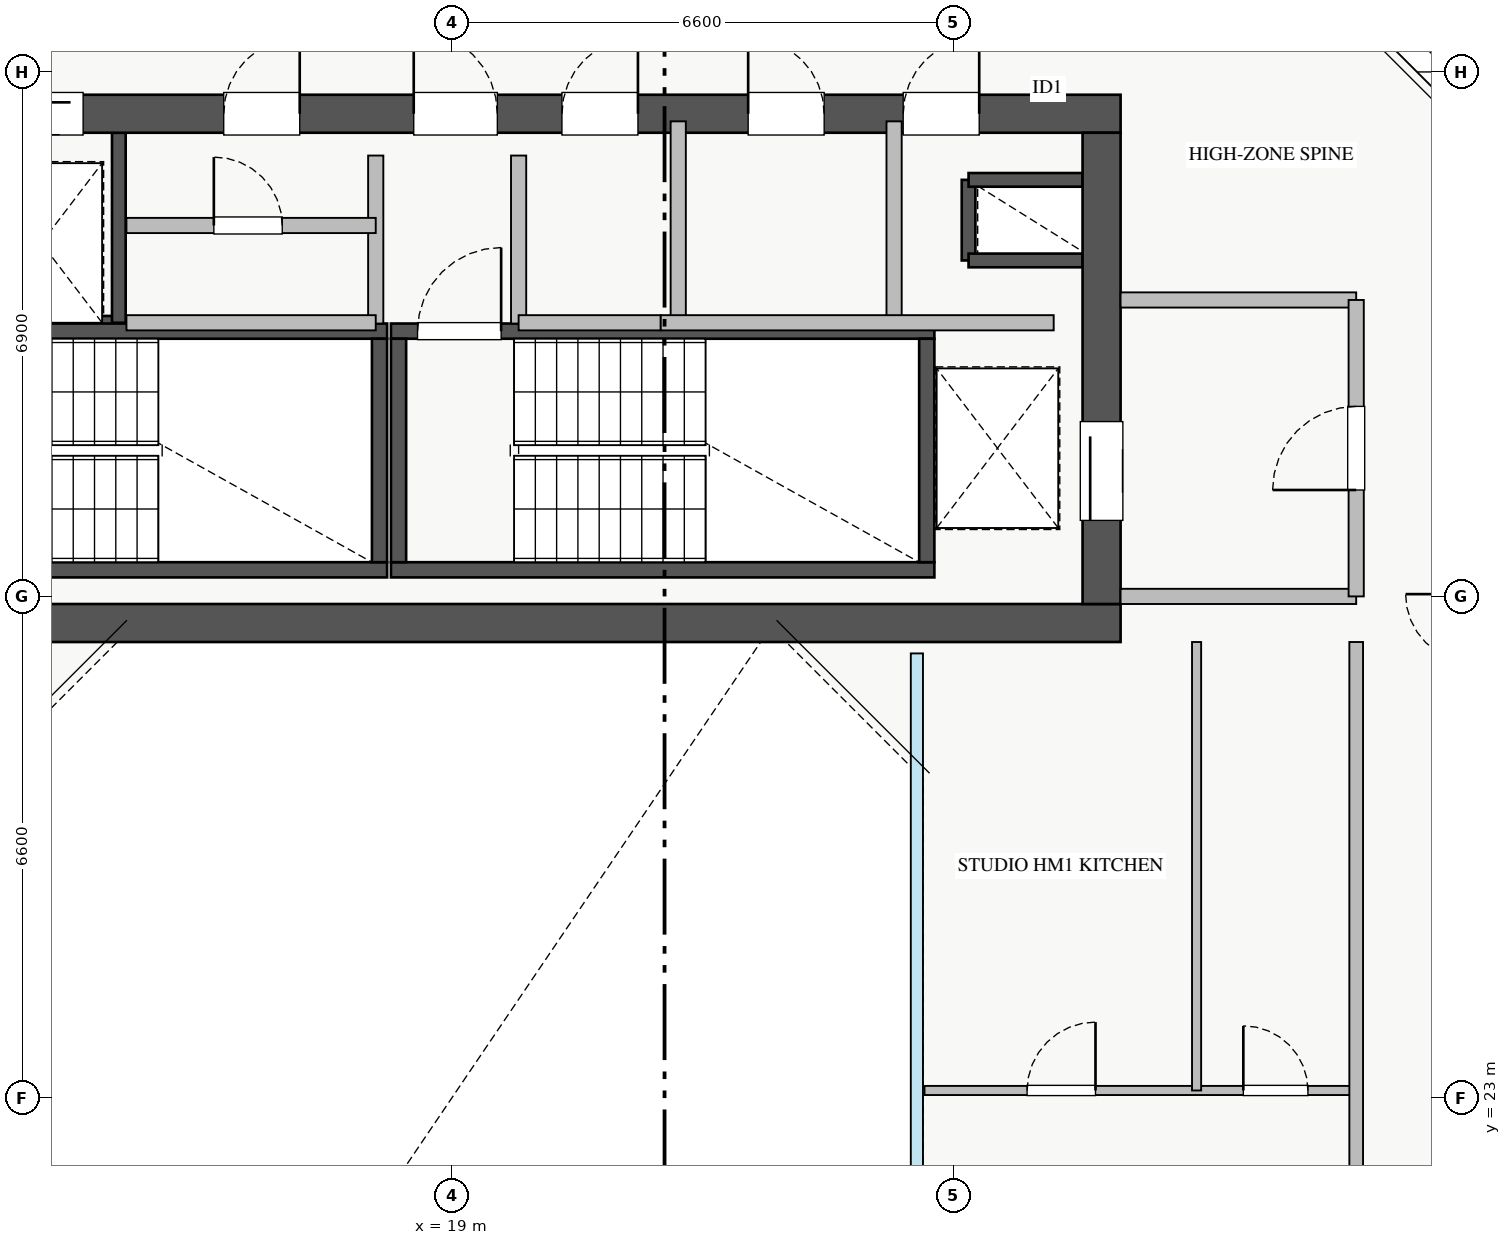
"""IFC4 building model, lengths in metres.
Left out: names, types, materials, properties, quantities, classifications, styles, units other than length and angle.
Written with IfcOpenShell. Run it as: python <this file> out.ifc"""

import sys

from ifc_helpers import new_model, si_unit, direction, frame, frame_2d, origin, place, context, subcontext, project, spatial, rectangle, extrude, source, transform, mapped, element, fill, save


model = new_model("IFC4")
c1 = context("Model", 3, precision=1e-05, world=origin(), true_north=direction((0.0, 1.0)))
c2 = subcontext(c1, "Body", "Model", "MODEL_VIEW")
j1 = project(units=[si_unit("LENGTHUNIT", "METRE"), si_unit("PLANEANGLEUNIT", "RADIAN")], contexts=[c1])
p1 = place(None, origin())
s1 = spatial("IfcSite", under=j1, at=p1, CompositionType="ELEMENT")
p2 = place(p1, origin())
s2 = spatial("IfcBuilding", under=s1, at=p2, CompositionType="ELEMENT")
p3 = place(p2, frame((0.0, 0.0, 190.5)))
s3 = spatial("IfcBuildingStorey", under=s2, at=p3, CompositionType="ELEMENT", Elevation=190.5)
p4 = place(p3, frame((12.68, 33.2, 0.0), z_axis=(0.0, 0.0, 1.0), x_axis=(1.0, 0.0, 0.0)))
e1 = element("IfcWall", 1, at=p4, inside=s3, PredefinedType="SHEAR", context=c2, shape_type="SweptSolid", body=[
    extrude(rectangle(XDim=1.94, YDim=0.18, at=frame_2d((0.97, 0.0))), origin(), (0.0, 0.0, 1.0), 3.07),
])
p5 = place(p3, frame((14.62, 33.2, 0.0), z_axis=(0.0, 0.0, 1.0), x_axis=(0.0, 1.0, 0.0)))
e2 = element("IfcWall", 2, at=p5, inside=s3, PredefinedType="SHEAR", context=c2, shape_type="SweptSolid", body=[
    extrude(rectangle(XDim=2.5, YDim=0.18, at=frame_2d((1.25, 0.0))), origin(), (0.0, 0.0, 1.0), 3.07),
])
p6 = place(p3, frame((25.8, 34.02, 0.0), z_axis=(0.0, 0.0, 1.0), x_axis=(0.0, 1.0, 0.0)))
e3 = element("IfcWall", 3, at=p6, inside=s3, PredefinedType="SHEAR", context=c2, shape_type="SweptSolid", body=[
    extrude(rectangle(XDim=1.06, YDim=0.18, at=frame_2d((0.53, 0.0))), origin(), (0.0, 0.0, 1.0), 3.07),
])
for number, where, z_axis, x_axis in (
    (4, (25.8, 35.08, 0.0), (0.0, 0.0, 1.0), (1.0, 0.0, 0.0)),
    (5, (25.8, 34.02, 0.0), (0.0, 0.0, 1.0), (1.0, 0.0, 0.0)),
):
    element("IfcWall", number, at=place(p3, frame(where, z_axis=z_axis, x_axis=x_axis)), inside=s3, PredefinedType="SHEAR", context=c2, shape_type="SweptSolid", body=[
        extrude(rectangle(XDim=1.5, YDim=0.18, at=frame_2d((0.75, 0.0))), origin(), (0.0, 0.0, 1.0), 3.07),
    ])
p7 = place(p3, frame((10.7, 29.95, 0.0), z_axis=(0.0, 0.0, 1.0), x_axis=(1.0, 0.0, 0.0)))
e6 = element("IfcWall", 6, at=p7, inside=s3, PredefinedType="SHEAR", context=c2, shape_type="SweptSolid", body=[
    extrude(rectangle(XDim=7.45, YDim=0.2, at=frame_2d((3.725, 0.0))), origin(), (0.0, 0.0, 1.0), 3.25),
])
p8 = place(p3, frame((10.7, 33.09, 0.0), z_axis=(0.0, 0.0, 1.0), x_axis=(1.0, 0.0, 0.0)))
e7 = element("IfcWall", 7, at=p8, inside=s3, PredefinedType="SHEAR", context=c2, shape_type="SweptSolid", body=[
    extrude(rectangle(XDim=7.45, YDim=0.2, at=frame_2d((3.725, 0.0))), origin(), (0.0, 0.0, 1.0), 3.25),
])
p9 = place(p8, frame((0.35, 0.0, 0.0)))
e8 = element("IfcOpeningElement", 8, at=p9, cuts=e7, PredefinedType="OPENING", context=c2, shape_type="SweptSolid", body=[
    extrude(rectangle(XDim=1.1, YDim=2.05, at=frame_2d((0.55, 1.025))), frame((0.0, 0.11, 0.0), z_axis=(0.0, -1.0, 0.0), x_axis=(1.0, 0.0, 0.0)), (0.0, 0.0, 1.0), 0.22),
])
p10 = place(p3, frame((18.05, 30.05, 0.0), z_axis=(0.0, 0.0, 1.0), x_axis=(0.0, 1.0, 0.0)))
e9 = element("IfcWall", 9, at=p10, inside=s3, PredefinedType="SHEAR", context=c2, shape_type="SweptSolid", body=[
    extrude(rectangle(XDim=2.94, YDim=0.2, at=frame_2d((1.47, 0.0))), origin(), (0.0, 0.0, 1.0), 3.25),
])
p11 = place(p3, frame((18.2, 29.95, 0.0), z_axis=(0.0, 0.0, 1.0), x_axis=(1.0, 0.0, 0.0)))
e10 = element("IfcWall", 10, at=p11, inside=s3, PredefinedType="SHEAR", context=c2, shape_type="SweptSolid", body=[
    extrude(rectangle(XDim=7.15, YDim=0.2, at=frame_2d((3.575, 0.0))), origin(), (0.0, 0.0, 1.0), 3.25),
])
p12 = place(p3, frame((18.2, 33.09, 0.0), z_axis=(0.0, 0.0, 1.0), x_axis=(1.0, 0.0, 0.0)))
e11 = element("IfcWall", 11, at=p12, inside=s3, PredefinedType="SHEAR", context=c2, shape_type="SweptSolid", body=[
    extrude(rectangle(XDim=7.15, YDim=0.2, at=frame_2d((3.575, 0.0))), origin(), (0.0, 0.0, 1.0), 3.25),
])
p13 = place(p12, frame((0.35, 0.0, 0.0)))
e12 = element("IfcOpeningElement", 12, at=p13, cuts=e11, PredefinedType="OPENING", context=c2, shape_type="SweptSolid", body=[
    extrude(rectangle(XDim=1.1, YDim=2.05, at=frame_2d((0.55, 1.025))), frame((0.0, 0.11, 0.0), z_axis=(0.0, -1.0, 0.0), x_axis=(1.0, 0.0, 0.0)), (0.0, 0.0, 1.0), 0.22),
])
for number, where, z_axis, x_axis in (
    (13, (18.3, 30.05, 0.0), (0.0, 0.0, 1.0), (0.0, 1.0, 0.0)),
    (14, (25.25, 30.05, 0.0), (0.0, 0.0, 1.0), (0.0, 1.0, 0.0)),
):
    element("IfcWall", number, at=place(p3, frame(where, z_axis=z_axis, x_axis=x_axis)), inside=s3, PredefinedType="SHEAR", context=c2, shape_type="SweptSolid", body=[
        extrude(rectangle(XDim=2.94, YDim=0.2, at=frame_2d((1.47, 0.0))), origin(), (0.0, 0.0, 1.0), 3.25),
    ])
p14 = place(p3, frame((10.2, 29.25, 0.0), z_axis=(0.0, 0.0, 1.0), x_axis=(1.0, 0.0, 0.0)))
e15 = element("IfcWall", 15, at=p14, inside=s3, PredefinedType="SHEAR", context=c2, shape_type="SweptSolid", body=[
    extrude(rectangle(XDim=17.6, YDim=0.5, at=frame_2d((8.8, 0.0))), origin(), (0.0, 0.0, 1.0), 3.25),
])
p15 = place(p3, frame((10.2, 35.95, 0.0), z_axis=(0.0, 0.0, 1.0), x_axis=(1.0, 0.0, 0.0)))
e16 = element("IfcWall", 16, at=p15, inside=s3, PredefinedType="SHEAR", context=c2, shape_type="SweptSolid", body=[
    extrude(rectangle(XDim=17.6, YDim=0.5, at=frame_2d((8.8, 0.0))), origin(), (0.0, 0.0, 1.0), 3.25),
])
p16 = place(p15, frame((1.15, 0.0, 0.0)))
e17 = element("IfcOpeningElement", 17, at=p16, cuts=e16, PredefinedType="OPENING", context=c2, shape_type="SweptSolid", body=[
    extrude(rectangle(XDim=1.1, YDim=2.05, at=frame_2d((0.55, 1.025))), frame((0.0, 0.26, 0.0), z_axis=(0.0, -1.0, 0.0), x_axis=(1.0, 0.0, 0.0)), (0.0, 0.0, 1.0), 0.52),
])
p17 = place(p15, frame((8.3, 0.0, 0.0)))
e18 = element("IfcOpeningElement", 18, at=p17, cuts=e16, PredefinedType="OPENING", context=c2, shape_type="SweptSolid", body=[
    extrude(rectangle(XDim=1.1, YDim=2.05, at=frame_2d((0.55, 1.025))), frame((0.0, 0.26, 0.0), z_axis=(0.0, -1.0, 0.0), x_axis=(1.0, 0.0, 0.0)), (0.0, 0.0, 1.0), 0.52),
])
p18 = place(p15, frame((2.85, 0.0, 0.0)))
e19 = element("IfcOpeningElement", 19, at=p18, cuts=e16, PredefinedType="OPENING", context=c2, shape_type="SweptSolid", body=[
    extrude(rectangle(XDim=1.1, YDim=2.05, at=frame_2d((0.55, 1.025))), frame((0.0, 0.26, 0.0), z_axis=(0.0, -1.0, 0.0), x_axis=(1.0, 0.0, 0.0)), (0.0, 0.0, 1.0), 0.52),
])
p19 = place(p15, frame((5.8, 0.0, 0.0)))
e20 = element("IfcOpeningElement", 20, at=p19, cuts=e16, PredefinedType="OPENING", context=c2, shape_type="SweptSolid", body=[
    extrude(rectangle(XDim=1.0, YDim=2.05, at=frame_2d((0.5, 1.025))), frame((0.0, 0.26, 0.0), z_axis=(0.0, -1.0, 0.0), x_axis=(1.0, 0.0, 0.0)), (0.0, 0.0, 1.0), 0.52),
])
p20 = place(p15, frame((14.74, 0.0, 0.0)))
e21 = element("IfcOpeningElement", 21, at=p20, cuts=e16, PredefinedType="OPENING", context=c2, shape_type="SweptSolid", body=[
    extrude(rectangle(XDim=1.0, YDim=2.05, at=frame_2d((0.5, 1.025))), frame((0.0, 0.26, 0.0), z_axis=(0.0, -1.0, 0.0), x_axis=(1.0, 0.0, 0.0)), (0.0, 0.0, 1.0), 0.52),
])
p21 = place(p15, frame((10.25, 0.0, 0.0)))
e22 = element("IfcOpeningElement", 22, at=p21, cuts=e16, PredefinedType="OPENING", context=c2, shape_type="SweptSolid", body=[
    extrude(rectangle(XDim=1.0, YDim=2.05, at=frame_2d((0.5, 1.025))), frame((0.0, 0.26, 0.0), z_axis=(0.0, -1.0, 0.0), x_axis=(1.0, 0.0, 0.0)), (0.0, 0.0, 1.0), 0.52),
])
p22 = place(p15, frame((12.7, 0.0, 0.0)))
e23 = element("IfcOpeningElement", 23, at=p22, cuts=e16, PredefinedType="OPENING", context=c2, shape_type="SweptSolid", body=[
    extrude(rectangle(XDim=1.0, YDim=2.05, at=frame_2d((0.5, 1.025))), frame((0.0, 0.26, 0.0), z_axis=(0.0, -1.0, 0.0), x_axis=(1.0, 0.0, 0.0)), (0.0, 0.0, 1.0), 0.52),
])
p23 = place(p3, frame((27.55, 29.5, 0.0), z_axis=(0.0, 0.0, 1.0), x_axis=(0.0, 1.0, 0.0)))
e24 = element("IfcWall", 24, at=p23, inside=s3, PredefinedType="SHEAR", context=c2, shape_type="SweptSolid", body=[
    extrude(rectangle(XDim=6.2, YDim=0.5, at=frame_2d((3.1, 0.0))), origin(), (0.0, 0.0, 1.0), 3.25),
])
p24 = place(p23, frame((1.1, 0.0, 0.0)))
e25 = element("IfcOpeningElement", 25, at=p24, cuts=e24, PredefinedType="OPENING", context=c2, shape_type="SweptSolid", body=[
    extrude(rectangle(XDim=1.3, YDim=2.05, at=frame_2d((0.65, 1.025))), frame((0.0, 0.26, 0.0), z_axis=(0.0, -1.0, 0.0), x_axis=(1.0, 0.0, 0.0)), (0.0, 0.0, 1.0), 0.52),
])
p25 = place(p3, frame((27.8, 29.6, 0.0), z_axis=(0.0, 0.0, 1.0), x_axis=(1.0, 0.0, 0.0)))
e26 = element("IfcWall", 26, at=p25, inside=s3, PredefinedType="PARTITIONING", context=c2, shape_type="SweptSolid", body=[
    extrude(rectangle(XDim=3.1, YDim=0.2, at=frame_2d((1.55, 0.0))), origin(), (0.0, 0.0, 1.0), 3.07),
])
p26 = place(p3, frame((27.8, 33.5, 0.0), z_axis=(0.0, 0.0, 1.0), x_axis=(1.0, 0.0, 0.0)))
e27 = element("IfcWall", 27, at=p26, inside=s3, PredefinedType="PARTITIONING", context=c2, shape_type="SweptSolid", body=[
    extrude(rectangle(XDim=3.1, YDim=0.2, at=frame_2d((1.55, 0.0))), origin(), (0.0, 0.0, 1.0), 2.265),
])
p27 = place(p3, frame((30.9, 29.6, 0.0), z_axis=(0.0, 0.0, 1.0), x_axis=(0.0, 1.0, 0.0)))
e28 = element("IfcWall", 28, at=p27, inside=s3, PredefinedType="PARTITIONING", context=c2, shape_type="SweptSolid", body=[
    extrude(rectangle(XDim=3.9, YDim=0.2, at=frame_2d((1.95, 0.0))), origin(), (0.0, 0.0, 1.0), 3.07),
])
p28 = place(p27, frame((1.4, 0.0, 0.0)))
e29 = element("IfcOpeningElement", 29, at=p28, cuts=e28, PredefinedType="OPENING", context=c2, shape_type="SweptSolid", body=[
    extrude(rectangle(XDim=1.1, YDim=2.05, at=frame_2d((0.55, 1.025))), frame((0.0, 0.11, 0.0), z_axis=(0.0, -1.0, 0.0), x_axis=(1.0, 0.0, 0.0)), (0.0, 0.0, 1.0), 0.22),
])
for number, where, z_axis, x_axis in (
    (30, (18.0, 33.19, 0.0), (0.0, 0.0, 1.0), (0.0, 1.0, 0.0)),
    (31, (19.88, 33.19, 0.0), (0.0, 0.0, 1.0), (0.0, 1.0, 0.0)),
):
    element("IfcWall", number, at=place(p3, frame(where, z_axis=z_axis, x_axis=x_axis)), inside=s3, PredefinedType="PARTITIONING", context=c2, shape_type="SweptSolid", body=[
        extrude(rectangle(XDim=2.21, YDim=0.2, at=frame_2d((1.105, 0.0))), origin(), (0.0, 0.0, 1.0), 3.07),
    ])
p29 = place(p3, frame((14.72, 34.48, 0.0), z_axis=(0.0, 0.0, 1.0), x_axis=(1.0, 0.0, 0.0)))
e32 = element("IfcWall", 32, at=p29, inside=s3, PredefinedType="PARTITIONING", context=c2, shape_type="SweptSolid", body=[
    extrude(rectangle(XDim=3.28, YDim=0.2, at=frame_2d((1.64, 0.0))), origin(), (0.0, 0.0, 1.0), 3.07),
])
p30 = place(p29, frame((1.15, 0.0, 0.0)))
e33 = element("IfcOpeningElement", 33, at=p30, cuts=e32, PredefinedType="OPENING", context=c2, shape_type="SweptSolid", body=[
    extrude(rectangle(XDim=0.9, YDim=2.05, at=frame_2d((0.45, 1.025))), frame((0.0, 0.11, 0.0), z_axis=(0.0, -1.0, 0.0), x_axis=(1.0, 0.0, 0.0)), (0.0, 0.0, 1.0), 0.22),
])
p31 = place(p3, frame((14.72, 33.2, 0.0), z_axis=(0.0, 0.0, 1.0), x_axis=(1.0, 0.0, 0.0)))
e34 = element("IfcWall", 34, at=p31, inside=s3, PredefinedType="PARTITIONING", context=c2, shape_type="SweptSolid", body=[
    extrude(rectangle(XDim=3.28, YDim=0.2, at=frame_2d((1.64, 0.0))), origin(), (0.0, 0.0, 1.0), 3.07),
])
p32 = place(p3, frame((24.82, 33.2, 0.0), z_axis=(0.0, 0.0, 1.0), x_axis=(0.0, 1.0, 0.0)))
e35 = element("IfcWall", 35, at=p32, inside=s3, PredefinedType="PARTITIONING", context=c2, shape_type="SweptSolid", body=[
    extrude(rectangle(XDim=2.65, YDim=0.2, at=frame_2d((1.325, 0.0))), origin(), (0.0, 0.0, 1.0), 3.07),
])
p33 = place(p3, frame((19.88, 33.2, 0.0), z_axis=(0.0, 0.0, 1.0), x_axis=(1.0, 0.0, 0.0)))
e36 = element("IfcWall", 36, at=p33, inside=s3, PredefinedType="PARTITIONING", context=c2, shape_type="SweptSolid", body=[
    extrude(rectangle(XDim=1.87, YDim=0.2, at=frame_2d((0.935, 0.0))), origin(), (0.0, 0.0, 1.0), 3.07),
])
p34 = place(p3, frame((21.98, 33.2, 0.0), z_axis=(0.0, 0.0, 1.0), x_axis=(0.0, 1.0, 0.0)))
e37 = element("IfcWall", 37, at=p34, inside=s3, PredefinedType="PARTITIONING", context=c2, shape_type="SweptSolid", body=[
    extrude(rectangle(XDim=2.65, YDim=0.2, at=frame_2d((1.325, 0.0))), origin(), (0.0, 0.0, 1.0), 3.07),
])
p35 = place(p3, frame((21.75, 33.2, 0.0), z_axis=(0.0, 0.0, 1.0), x_axis=(1.0, 0.0, 0.0)))
e38 = element("IfcWall", 38, at=p35, inside=s3, PredefinedType="PARTITIONING", context=c2, shape_type="SweptSolid", body=[
    extrude(rectangle(XDim=5.17, YDim=0.2, at=frame_2d((2.585, 0.0))), origin(), (0.0, 0.0, 1.0), 3.07),
])
p36 = place(p3, frame((25.22, 23.1, 0.0), z_axis=(0.0, 0.0, 1.0), x_axis=(1.0, 0.0, 0.0)))
e39 = element("IfcWall", 39, at=p36, inside=s3, PredefinedType="PLUMBINGWALL", context=c2, shape_type="SweptSolid", body=[
    extrude(rectangle(XDim=5.68, YDim=0.12, at=frame_2d((2.84, 0.0))), origin(), (0.0, 0.0, 1.0), 3.07),
])
p37 = place(p36, frame((1.35, 0.0, 0.0)))
e40 = element("IfcOpeningElement", 40, at=p37, cuts=e39, PredefinedType="OPENING", context=c2, shape_type="SweptSolid", body=[
    extrude(rectangle(XDim=0.9, YDim=2.05, at=frame_2d((0.45, 1.025))), frame((0.0, 0.07, 0.0), z_axis=(0.0, -1.0, 0.0), x_axis=(1.0, 0.0, 0.0)), (0.0, 0.0, 1.0), 0.14),
])
p38 = place(p36, frame((4.195, 0.0, 0.0)))
e41 = element("IfcOpeningElement", 41, at=p38, cuts=e39, PredefinedType="OPENING", context=c2, shape_type="SweptSolid", body=[
    extrude(rectangle(XDim=0.85, YDim=2.05, at=frame_2d((0.425, 1.025))), frame((0.0, 0.07, 0.0), z_axis=(0.0, -1.0, 0.0), x_axis=(1.0, 0.0, 0.0)), (0.0, 0.0, 1.0), 0.14),
])
p39 = place(p3, frame((28.8, 23.1, 0.0), z_axis=(0.0, 0.0, 1.0), x_axis=(0.0, 1.0, 0.0)))
e42 = element("IfcWall", 42, at=p39, inside=s3, PredefinedType="PLUMBINGWALL", context=c2, shape_type="SweptSolid", body=[
    extrude(rectangle(XDim=5.9, YDim=0.12, at=frame_2d((2.95, 0.0))), origin(), (0.0, 0.0, 1.0), 3.07),
])
p40 = place(p3, frame((30.9, 17.0, 0.0), z_axis=(0.0, 0.0, 1.0), x_axis=(0.0, 1.0, 0.0)))
e43 = element("IfcWall", 43, at=p40, inside=s3, PredefinedType="PARTITIONING", context=c2, shape_type="SweptSolid", body=[
    extrude(rectangle(XDim=12.0, YDim=0.18, at=frame_2d((6.0, 0.0))), origin(), (0.0, 0.0, 1.0), 3.07),
])
p41 = place(p40, frame((2.36, 0.0, 0.0)))
e44 = element("IfcOpeningElement", 44, at=p41, cuts=e43, PredefinedType="OPENING", context=c2, shape_type="SweptSolid", body=[
    extrude(rectangle(XDim=1.0, YDim=2.05, at=frame_2d((0.5, 1.025))), frame((0.0, 0.1, 0.0), z_axis=(0.0, -1.0, 0.0), x_axis=(1.0, 0.0, 0.0)), (0.0, 0.0, 1.0), 0.2),
])
m1 = source(origin(), c2, "Body", "SweptSolid", [
    extrude(rectangle(XDim=1.3, YDim=2.05, at=frame_2d((0.65, 1.025))), frame((0.0, 0.025, 0.0), z_axis=(0.0, -1.0, 0.0), x_axis=(1.0, 0.0, 0.0)), (0.0, 0.0, 1.0), 0.05),
])
p42 = place(p24, origin())
e45 = element("IfcDoor", 45, at=p42, inside=s3, OperationType="SLIDING_TO_LEFT", PredefinedType="DOOR", context=c2, shape_type="MappedRepresentation", body=[
    mapped(m1, transform((0.0, 0.0, 0.0), x_axis=(1.0, 0.0, 0.0), y_axis=(0.0, 1.0, 0.0), z_axis=(0.0, 0.0, 1.0), scale=1.0)),
])
fill(e25, e45)
m2 = source(origin(), c2, "Body", "SweptSolid", [
    extrude(rectangle(XDim=1.1, YDim=2.05, at=frame_2d((0.55, 1.025))), frame((0.0, 0.025, 0.0), z_axis=(0.0, -1.0, 0.0), x_axis=(1.0, 0.0, 0.0)), (0.0, 0.0, 1.0), 0.05),
])
p43 = place(p17, origin())
e46 = element("IfcDoor", 46, at=p43, inside=s3, OperationType="SINGLE_SWING_LEFT", PredefinedType="DOOR", context=c2, shape_type="MappedRepresentation", body=[
    mapped(m2, transform((0.0, 0.0, 0.0), x_axis=(1.0, 0.0, 0.0), y_axis=(0.0, 1.0, 0.0), z_axis=(0.0, 0.0, 1.0), scale=1.0)),
])
fill(e18, e46)
p44 = place(p13, origin())
e47 = element("IfcDoor", 47, at=p44, inside=s3, OperationType="SINGLE_SWING_RIGHT", PredefinedType="DOOR", context=c2, shape_type="MappedRepresentation", body=[
    mapped(m2, transform((0.0, 0.0, 0.0), x_axis=(1.0, 0.0, 0.0), y_axis=(0.0, 1.0, 0.0), z_axis=(0.0, 0.0, 1.0), scale=1.0)),
])
fill(e12, e47)
p45 = place(p18, origin())
e48 = element("IfcDoor", 48, at=p45, inside=s3, OperationType="SLIDING_TO_LEFT", PredefinedType="DOOR", context=c2, shape_type="MappedRepresentation", body=[
    mapped(m2, transform((0.0, 0.0, 0.0), x_axis=(1.0, 0.0, 0.0), y_axis=(0.0, 1.0, 0.0), z_axis=(0.0, 0.0, 1.0), scale=1.0)),
])
fill(e19, e48)
m3 = source(origin(), c2, "Body", "SweptSolid", [
    extrude(rectangle(XDim=1.0, YDim=2.05, at=frame_2d((0.5, 1.025))), frame((0.0, 0.025, 0.0), z_axis=(0.0, -1.0, 0.0), x_axis=(1.0, 0.0, 0.0)), (0.0, 0.0, 1.0), 0.05),
])
p46 = place(p19, origin())
e49 = element("IfcDoor", 49, at=p46, inside=s3, OperationType="SINGLE_SWING_RIGHT", PredefinedType="DOOR", context=c2, shape_type="MappedRepresentation", body=[
    mapped(m3, transform((0.0, 0.0, 0.0), x_axis=(1.0, 0.0, 0.0), y_axis=(0.0, 1.0, 0.0), z_axis=(0.0, 0.0, 1.0), scale=1.0)),
])
fill(e20, e49)
p47 = place(p20, origin())
e50 = element("IfcDoor", 50, at=p47, inside=s3, OperationType="SINGLE_SWING_RIGHT", PredefinedType="DOOR", context=c2, shape_type="MappedRepresentation", body=[
    mapped(m3, transform((0.0, 0.0, 0.0), x_axis=(1.0, 0.0, 0.0), y_axis=(0.0, 1.0, 0.0), z_axis=(0.0, 0.0, 1.0), scale=1.0)),
])
fill(e21, e50)
p48 = place(p21, origin())
e51 = element("IfcDoor", 51, at=p48, inside=s3, OperationType="SINGLE_SWING_RIGHT", PredefinedType="DOOR", context=c2, shape_type="MappedRepresentation", body=[
    mapped(m3, transform((0.0, 0.0, 0.0), x_axis=(1.0, 0.0, 0.0), y_axis=(0.0, 1.0, 0.0), z_axis=(0.0, 0.0, 1.0), scale=1.0)),
])
fill(e22, e51)
p49 = place(p22, origin())
e52 = element("IfcDoor", 52, at=p49, inside=s3, OperationType="SINGLE_SWING_LEFT", PredefinedType="DOOR", context=c2, shape_type="MappedRepresentation", body=[
    mapped(m3, transform((0.0, 0.0, 0.0), x_axis=(1.0, 0.0, 0.0), y_axis=(0.0, 1.0, 0.0), z_axis=(0.0, 0.0, 1.0), scale=1.0)),
])
fill(e23, e52)
p50 = place(p28, origin())
e53 = element("IfcDoor", 53, at=p50, inside=s3, OperationType="SINGLE_SWING_LEFT", PredefinedType="DOOR", context=c2, shape_type="MappedRepresentation", body=[
    mapped(m2, transform((0.0, 0.0, 0.0), x_axis=(1.0, 0.0, 0.0), y_axis=(0.0, 1.0, 0.0), z_axis=(0.0, 0.0, 1.0), scale=1.0)),
])
fill(e29, e53)
m4 = source(origin(), c2, "Body", "SweptSolid", [
    extrude(rectangle(XDim=0.9, YDim=2.05, at=frame_2d((0.45, 1.025))), frame((0.0, 0.025, 0.0), z_axis=(0.0, -1.0, 0.0), x_axis=(1.0, 0.0, 0.0)), (0.0, 0.0, 1.0), 0.05),
])
p51 = place(p30, origin())
e54 = element("IfcDoor", 54, at=p51, inside=s3, OperationType="SINGLE_SWING_LEFT", PredefinedType="DOOR", context=c2, shape_type="MappedRepresentation", body=[
    mapped(m4, transform((0.0, 0.0, 0.0), x_axis=(1.0, 0.0, 0.0), y_axis=(0.0, 1.0, 0.0), z_axis=(0.0, 0.0, 1.0), scale=1.0)),
])
fill(e33, e54)
p52 = place(p37, origin())
e55 = element("IfcDoor", 55, at=p52, inside=s3, OperationType="SINGLE_SWING_RIGHT", PredefinedType="DOOR", context=c2, shape_type="MappedRepresentation", body=[
    mapped(m4, transform((0.0, 0.0, 0.0), x_axis=(1.0, 0.0, 0.0), y_axis=(0.0, 1.0, 0.0), z_axis=(0.0, 0.0, 1.0), scale=1.0)),
])
fill(e40, e55)
m5 = source(origin(), c2, "Body", "SweptSolid", [
    extrude(rectangle(XDim=0.85, YDim=2.05, at=frame_2d((0.425, 1.025))), frame((0.0, 0.025, 0.0), z_axis=(0.0, -1.0, 0.0), x_axis=(1.0, 0.0, 0.0)), (0.0, 0.0, 1.0), 0.05),
])
p53 = place(p38, origin())
e56 = element("IfcDoor", 56, at=p53, inside=s3, OperationType="SINGLE_SWING_LEFT", PredefinedType="DOOR", context=c2, shape_type="MappedRepresentation", body=[
    mapped(m5, transform((0.0, 0.0, 0.0), x_axis=(1.0, 0.0, 0.0), y_axis=(0.0, 1.0, 0.0), z_axis=(0.0, 0.0, 1.0), scale=1.0)),
])
fill(e41, e56)
save(model, sys.argv[1])
